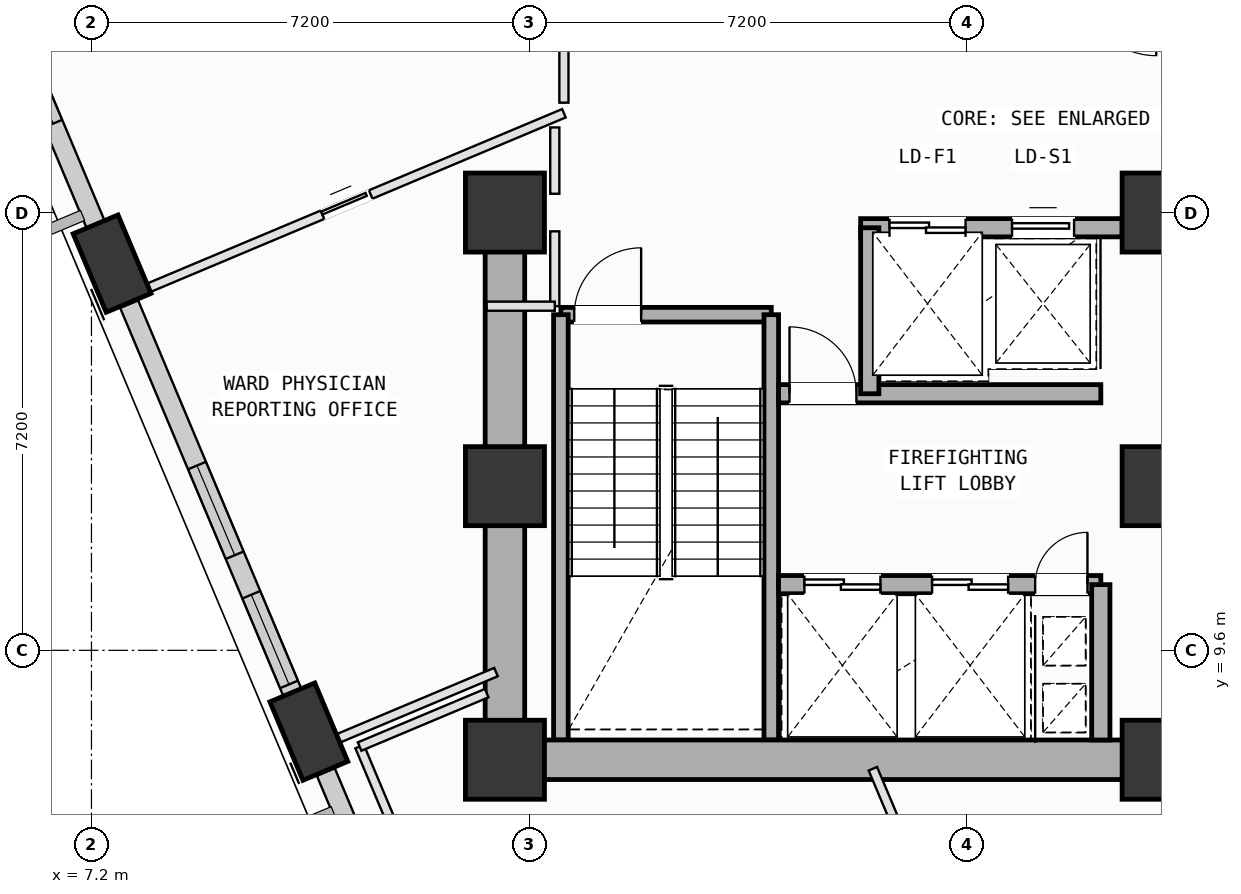
"""IFC4 building model, lengths in metres.
Left out: names, types, materials, properties, quantities, classifications, styles, units other than length and angle.
Written with IfcOpenShell. Run it as: python <this file> out.ifc"""

import sys

from ifc_helpers import new_model, si_unit, direction, frame, frame_2d, origin, origin_2d, place, context, subcontext, project, spatial, rectangle, extrude, element, fill, save


model = new_model("IFC4")
c1 = context("Model", 3, precision=1e-05, world=origin(), true_north=direction((0.0, 1.0)))
c2 = subcontext(c1, "Body", "Model", "MODEL_VIEW")
j1 = project(units=[si_unit("LENGTHUNIT", "METRE"), si_unit("PLANEANGLEUNIT", "RADIAN")], contexts=[c1])
p1 = place(None, origin())
s1 = spatial("IfcSite", under=j1, at=p1, CompositionType="ELEMENT")
p2 = place(p1, origin())
s2 = spatial("IfcBuilding", under=s1, at=p2, CompositionType="ELEMENT")
p3 = place(p2, frame((0.0, 0.0, 120.4)))
s3 = spatial("IfcBuildingStorey", under=s2, at=p3, CompositionType="ELEMENT", Elevation=120.4)
for number, where, z_axis, x_axis in (
    (1, (14.0, 7.8, 0.0), (0.0, 0.0, 1.0), (1.0, 0.0, 0.0)),
    (2, (14.0, 12.3, 0.0), (0.0, 0.0, 1.0), (1.0, 0.0, 0.0)),
    (3, (14.0, 16.8, 0.0), (0.0, 0.0, 1.0), (1.0, 0.0, 0.0)),
    (4, (24.8, 7.8, 0.0), (0.0, 0.0, 1.0), (1.0, 0.0, 0.0)),
    (5, (24.8, 12.3, 0.0), (0.0, 0.0, 1.0), (1.0, 0.0, 0.0)),
    (6, (24.8, 16.8, 0.0), (0.0, 0.0, 1.0), (1.0, 0.0, 0.0)),
):
    element("IfcColumn", number, at=place(p3, frame(where, z_axis=z_axis, x_axis=x_axis)), inside=s3, PredefinedType="COLUMN", context=c2, shape_type="SweptSolid", body=[
        extrude(rectangle(XDim=1.3, YDim=1.3, at=origin_2d()), origin(), (0.0, 0.0, 1.0), 4.0),
    ])
p4 = place(p3, frame((7.539, 15.96, 0.002), z_axis=(0.037268092554, -0.107069894569, 0.993552780155), x_axis=(-0.66706793096, 0.737629715316, 0.104512097711)))
e7 = element("IfcColumn", 7, at=p4, inside=s3, PredefinedType="COLUMN", context=c2, shape_type="SweptSolid", body=[
    extrude(rectangle(XDim=1.4, YDim=0.8, at=origin_2d()), origin(), (0.0, 0.0, 1.0), 4.022),
])
p5 = place(p3, frame((10.775, 8.263, 0.002), z_axis=(0.068869636682, -0.09344426475, 0.993239720575), x_axis=(-0.855179341889, 0.507165586938, 0.107011030419)))
e8 = element("IfcColumn", 8, at=p5, inside=s3, PredefinedType="COLUMN", context=c2, shape_type="SweptSolid", body=[
    extrude(rectangle(XDim=1.4, YDim=0.8, at=origin_2d()), origin(), (0.0, 0.0, 1.0), 4.023),
])
p6 = place(p3, frame((7.435, 16.208, 0.0), z_axis=(0.0, 0.0, 1.0), x_axis=(-0.387540340387, 0.921852745601, 0.0)))
e9 = element("IfcWall", 9, at=p6, inside=s3, PredefinedType="SOLIDWALL", context=c2, shape_type="SweptSolid", body=[
    extrude(rectangle(XDim=5.662, YDim=0.32, at=frame_2d((2.831, 0.0))), origin(), (0.0, 0.0, 1.0), 3.165),
])
p7 = place(p6, frame((2.23, 0.0, 0.75)))
e10 = element("IfcOpeningElement", 10, at=p7, cuts=e9, PredefinedType="OPENING", context=c2, shape_type="SweptSolid", body=[
    extrude(rectangle(XDim=1.2, YDim=1.75, at=frame_2d((0.6, 0.875))), frame((0.0, 0.17, 0.0), z_axis=(0.0, -1.0, 0.0), x_axis=(1.0, 0.0, 0.0)), (0.0, 0.0, 1.0), 0.34),
])
p8 = place(p3, frame((10.672, 8.508, 0.0), z_axis=(0.0, 0.0, 1.0), x_axis=(-0.387524577065, 0.921859372231, 0.0)))
e11 = element("IfcWall", 11, at=p8, inside=s3, PredefinedType="SOLIDWALL", context=c2, shape_type="SweptSolid", body=[
    extrude(rectangle(XDim=7.36, YDim=0.32, at=frame_2d((3.68, 0.0))), origin(), (0.0, 0.0, 1.0), 3.165),
])
p9 = place(p8, frame((2.881, 0.0, 0.75)))
e12 = element("IfcOpeningElement", 12, at=p9, cuts=e11, PredefinedType="OPENING", context=c2, shape_type="SweptSolid", body=[
    extrude(rectangle(XDim=1.6, YDim=1.95, at=frame_2d((0.8, 0.975))), frame((0.0, 0.17, 0.0), z_axis=(0.0, -1.0, 0.0), x_axis=(1.0, 0.0, 0.0)), (0.0, 0.0, 1.0), 0.34),
])
p10 = place(p8, frame((0.576, 0.0, 0.75)))
e13 = element("IfcOpeningElement", 13, at=p10, cuts=e11, PredefinedType="OPENING", context=c2, shape_type="SweptSolid", body=[
    extrude(rectangle(XDim=1.6, YDim=1.95, at=frame_2d((0.8, 0.975))), frame((0.0, 0.17, 0.0), z_axis=(0.0, -1.0, 0.0), x_axis=(1.0, 0.0, 0.0)), (0.0, 0.0, 1.0), 0.34),
])
p11 = place(p3, frame((13.466, 1.862, 0.0), z_axis=(0.0, 0.0, 1.0), x_axis=(-0.387499238031, 0.921870023661, 0.0)))
e14 = element("IfcWall", 14, at=p11, inside=s3, PredefinedType="SOLIDWALL", context=c2, shape_type="SweptSolid", body=[
    extrude(rectangle(XDim=6.224, YDim=0.32, at=frame_2d((3.112, 0.0))), origin(), (0.0, 0.0, 1.0), 3.165),
])
p12 = place(p11, frame((2.114, 0.0, 0.75)))
e15 = element("IfcOpeningElement", 15, at=p12, cuts=e14, PredefinedType="OPENING", context=c2, shape_type="SweptSolid", body=[
    extrude(rectangle(XDim=2.0, YDim=1.95, at=frame_2d((1.0, 0.975))), frame((0.0, 0.17, 0.0), z_axis=(0.0, -1.0, 0.0), x_axis=(1.0, 0.0, 0.0)), (0.0, 0.0, 1.0), 0.34),
])
p13 = place(p3, frame((14.92, 15.12, 0.0), z_axis=(0.0, 0.0, 1.0), x_axis=(1.0, 0.0, 0.0)))
e16 = element("IfcWall", 16, at=p13, inside=s3, PredefinedType="SOLIDWALL", context=c2, shape_type="SweptSolid", body=[
    extrude(rectangle(XDim=3.46, YDim=0.24, at=frame_2d((1.73, 0.0))), origin(), (0.0, 0.0, 1.0), 3.78),
])
p14 = place(p13, frame((0.22, 0.0, 0.0)))
e17 = element("IfcOpeningElement", 17, at=p14, cuts=e16, PredefinedType="OPENING", context=c2, shape_type="SweptSolid", body=[
    extrude(rectangle(XDim=1.1, YDim=2.15, at=frame_2d((0.55, 1.075))), frame((0.0, 0.13, 0.0), z_axis=(0.0, -1.0, 0.0), x_axis=(1.0, 0.0, 0.0)), (0.0, 0.0, 1.0), 0.26),
])
for number, where, z_axis, x_axis in (
    (18, (18.38, 15.12, 0.0), (0.0, 0.0, 1.0), (0.0, -1.0, 0.0)),
    (19, (14.92, 8.125, 0.0), (0.0, 0.0, 1.0), (0.0, 1.0, 0.0)),
):
    element("IfcWall", number, at=place(p3, frame(where, z_axis=z_axis, x_axis=x_axis)), inside=s3, PredefinedType="SOLIDWALL", context=c2, shape_type="SweptSolid", body=[
        extrude(rectangle(XDim=6.995, YDim=0.24, at=frame_2d((3.498, 0.0))), origin(), (0.0, 0.0, 1.0), 3.78),
    ])
for number, where, z_axis, x_axis in (
    (20, (14.0, 7.8, 0.0), (0.0, 0.0, 1.0), (1.0, 0.0, 0.0)),
    (21, (24.8, 7.8, 0.0), (0.0, 0.0, 1.0), (1.0, 0.0, 0.0)),
):
    element("IfcWall", number, at=place(p3, frame(where, z_axis=z_axis, x_axis=x_axis)), inside=s3, PredefinedType="SHEAR", context=c2, shape_type="SweptSolid", body=[
        extrude(rectangle(XDim=10.8, YDim=0.65, at=frame_2d((5.4, 0.0))), origin(), (0.0, 0.0, 1.0), 3.78),
    ])
p15 = place(p3, frame((14.0, 16.8, 0.0), z_axis=(0.0, 0.0, 1.0), x_axis=(0.0, -1.0, 0.0)))
e22 = element("IfcWall", 22, at=p15, inside=s3, PredefinedType="SHEAR", context=c2, shape_type="SweptSolid", body=[
    extrude(rectangle(XDim=9.0, YDim=0.65, at=frame_2d((4.5, 0.0))), origin(), (0.0, 0.0, 1.0), 3.78),
])
p16 = place(p3, frame((19.85, 16.55, 0.0), z_axis=(0.0, 0.0, 1.0), x_axis=(1.0, 0.0, 0.0)))
e23 = element("IfcWall", 23, at=p16, inside=s3, PredefinedType="SOLIDWALL", context=c2, shape_type="SweptSolid", body=[
    extrude(rectangle(XDim=4.3, YDim=0.3, at=frame_2d((2.15, 0.0))), origin(), (0.0, 0.0, 1.0), 3.78),
])
p17 = place(p16, frame((0.475, 0.0, 0.0)))
e24 = element("IfcOpeningElement", 24, at=p17, cuts=e23, PredefinedType="OPENING", context=c2, shape_type="SweptSolid", body=[
    extrude(rectangle(XDim=1.25, YDim=2.18, at=frame_2d((0.625, 1.09))), frame((0.0, 0.16, 0.0), z_axis=(0.0, -1.0, 0.0), x_axis=(1.0, 0.0, 0.0)), (0.0, 0.0, 1.0), 0.32),
])
p18 = place(p16, frame((2.49, 0.0, 0.0)))
e25 = element("IfcOpeningElement", 25, at=p18, cuts=e23, PredefinedType="OPENING", context=c2, shape_type="SweptSolid", body=[
    extrude(rectangle(XDim=1.02, YDim=2.12, at=frame_2d((0.51, 1.06))), frame((0.0, 0.16, 0.0), z_axis=(0.0, -1.0, 0.0), x_axis=(1.0, 0.0, 0.0)), (0.0, 0.0, 1.0), 0.32),
])
p19 = place(p3, frame((18.5, 10.68, 0.0), z_axis=(0.0, 0.0, 1.0), x_axis=(1.0, 0.0, 0.0)))
e26 = element("IfcWall", 26, at=p19, inside=s3, PredefinedType="SOLIDWALL", context=c2, shape_type="SweptSolid", body=[
    extrude(rectangle(XDim=5.3, YDim=0.3, at=frame_2d((2.65, 0.0))), origin(), (0.0, 0.0, 1.0), 3.78),
])
p20 = place(p19, frame((4.22, 0.0, 0.0)))
e27 = element("IfcOpeningElement", 27, at=p20, cuts=e26, PredefinedType="OPENING", context=c2, shape_type="SweptSolid", body=[
    extrude(rectangle(XDim=0.86, YDim=2.06, at=frame_2d((0.43, 1.03))), frame((0.0, 0.16, 0.0), z_axis=(0.0, -1.0, 0.0), x_axis=(1.0, 0.0, 0.0)), (0.0, 0.0, 1.0), 0.32),
])
p21 = place(p19, frame((0.425, 0.0, 0.0)))
e28 = element("IfcOpeningElement", 28, at=p21, cuts=e26, PredefinedType="OPENING", context=c2, shape_type="SweptSolid", body=[
    extrude(rectangle(XDim=1.25, YDim=2.18, at=frame_2d((0.625, 1.09))), frame((0.0, 0.16, 0.0), z_axis=(0.0, -1.0, 0.0), x_axis=(1.0, 0.0, 0.0)), (0.0, 0.0, 1.0), 0.32),
])
p22 = place(p19, frame((2.525, 0.0, 0.0)))
e29 = element("IfcOpeningElement", 29, at=p22, cuts=e26, PredefinedType="OPENING", context=c2, shape_type="SweptSolid", body=[
    extrude(rectangle(XDim=1.25, YDim=2.18, at=frame_2d((0.625, 1.09))), frame((0.0, 0.16, 0.0), z_axis=(0.0, -1.0, 0.0), x_axis=(1.0, 0.0, 0.0)), (0.0, 0.0, 1.0), 0.32),
])
p23 = place(p3, frame((18.5, 13.82, 0.0), z_axis=(0.0, 0.0, 1.0), x_axis=(1.0, 0.0, 0.0)))
e30 = element("IfcWall", 30, at=p23, inside=s3, PredefinedType="SOLIDWALL", context=c2, shape_type="SweptSolid", body=[
    extrude(rectangle(XDim=5.3, YDim=0.3, at=frame_2d((2.65, 0.0))), origin(), (0.0, 0.0, 1.0), 3.78),
])
p24 = place(p23, frame((0.18, 0.0, 0.0)))
e31 = element("IfcOpeningElement", 31, at=p24, cuts=e30, PredefinedType="OPENING", context=c2, shape_type="SweptSolid", body=[
    extrude(rectangle(XDim=1.1, YDim=2.15, at=frame_2d((0.55, 1.075))), frame((0.0, 0.16, 0.0), z_axis=(0.0, -1.0, 0.0), x_axis=(1.0, 0.0, 0.0)), (0.0, 0.0, 1.0), 0.32),
])
p25 = place(p3, frame((23.8, 8.125, 0.0), z_axis=(0.0, 0.0, 1.0), x_axis=(0.0, 1.0, 0.0)))
e32 = element("IfcWall", 32, at=p25, inside=s3, PredefinedType="SOLIDWALL", context=c2, shape_type="SweptSolid", body=[
    extrude(rectangle(XDim=2.555, YDim=0.3, at=frame_2d((1.277, 0.0))), origin(), (0.0, 0.0, 1.0), 3.78),
])
p26 = place(p3, frame((20.0, 13.82, 0.0), z_axis=(0.0, 0.0, 1.0), x_axis=(0.0, 1.0, 0.0)))
e33 = element("IfcWall", 33, at=p26, inside=s3, PredefinedType="SOLIDWALL", context=c2, shape_type="SweptSolid", body=[
    extrude(rectangle(XDim=2.73, YDim=0.3, at=frame_2d((1.365, 0.0))), origin(), (0.0, 0.0, 1.0), 3.78),
])
p27 = place(p3, frame((16.545, -3.722, 0.0), z_axis=(0.0, 0.0, 1.0), x_axis=(-0.387528098658, 0.921857891841, 0.0)))
e34 = element("IfcWall", 34, at=p27, inside=s3, PredefinedType="PARTITIONING", context=c2, shape_type="SweptSolid", body=[
    extrude(rectangle(XDim=12.734, YDim=0.15, at=frame_2d((6.367, 0.0))), origin(), (0.0, 0.0, 1.0), 3.165),
])
p28 = place(p3, frame((11.61, 8.017, 0.0), z_axis=(0.0, 0.0, 1.0), x_axis=(0.921797458045, 0.38767182815, 0.0)))
e35 = element("IfcWall", 35, at=p28, inside=s3, PredefinedType="PARTITIONING", context=c2, shape_type="SweptSolid", body=[
    extrude(rectangle(XDim=2.267, YDim=0.15, at=frame_2d((1.134, 0.0))), origin(), (0.0, 0.0, 1.0), 3.78),
])
p29 = place(p3, frame((20.051, 7.652, 0.0), z_axis=(0.0, 0.0, 1.0), x_axis=(0.387477050982, -0.921879349461, 0.0)))
e36 = element("IfcWall", 36, at=p29, inside=s3, PredefinedType="PARTITIONING", context=c2, shape_type="SweptSolid", body=[
    extrude(rectangle(XDim=11.557, YDim=0.15, at=frame_2d((5.778, 0.0))), origin(), (0.0, 0.0, 1.0), 3.78),
])
p30 = place(p29, frame((5.511, 0.0, 0.0)))
e37 = element("IfcOpeningElement", 37, at=p30, cuts=e36, PredefinedType="OPENING", context=c2, shape_type="SweptSolid", body=[
    extrude(rectangle(XDim=0.86, YDim=2.06, at=frame_2d((0.43, 1.03))), frame((0.0, 0.085, 0.0), z_axis=(0.0, -1.0, 0.0), x_axis=(1.0, 0.0, 0.0)), (0.0, 0.0, 1.0), 0.17),
])
p31 = place(p3, frame((14.82, 18.2, 0.0), z_axis=(0.0, 0.0, 1.0), x_axis=(0.0, -1.0, 0.0)))
e38 = element("IfcWall", 38, at=p31, inside=s3, PredefinedType="PARTITIONING", context=c2, shape_type="SweptSolid", body=[
    extrude(rectangle(XDim=1.091, YDim=0.15, at=frame_2d((0.545, 0.0))), origin(), (0.0, 0.0, 1.0), 3.78),
])
p32 = place(p3, frame((14.82, 16.491, 0.0), z_axis=(0.0, 0.0, 1.0), x_axis=(0.0, -1.0, 0.0)))
e39 = element("IfcWall", 39, at=p32, inside=s3, PredefinedType="PARTITIONING", context=c2, shape_type="SweptSolid", body=[
    extrude(rectangle(XDim=1.231, YDim=0.15, at=frame_2d((0.615, 0.0))), origin(), (0.0, 0.0, 1.0), 3.78),
])
p33 = place(p3, frame((14.82, 15.26, 0.0), z_axis=(0.0, 0.0, 1.0), x_axis=(-1.0, 0.0, 0.0)))
e40 = element("IfcWall", 40, at=p33, inside=s3, PredefinedType="PARTITIONING", context=c2, shape_type="SweptSolid", body=[
    extrude(rectangle(XDim=1.12, YDim=0.15, at=frame_2d((0.56, 0.0))), origin(), (0.0, 0.0, 1.0), 3.78),
])
p34 = place(p3, frame((13.853, 9.242, 0.0), z_axis=(0.0, 0.0, 1.0), x_axis=(-0.921859178331, -0.387525038321, 0.0)))
e41 = element("IfcWall", 41, at=p34, inside=s3, PredefinedType="PARTITIONING", context=c2, shape_type="SweptSolid", body=[
    extrude(rectangle(XDim=3.447, YDim=0.15, at=frame_2d((1.724, 0.0))), origin(), (0.0, 0.0, 1.0), 3.78),
])
p35 = place(p3, frame((10.675, 7.906, 0.0), z_axis=(0.0, 0.0, 1.0), x_axis=(-0.386702592906, 0.922204480926, 0.0)))
e42 = element("IfcWall", 42, at=p35, inside=s3, PredefinedType="PARTITIONING", context=c2, shape_type="SweptSolid", body=[
    extrude(rectangle(XDim=0.556, YDim=0.15, at=frame_2d((0.278, 0.0))), origin(), (0.0, 0.0, 1.0), 3.165),
])
p36 = place(p3, frame((7.822, 15.428, 0.0), z_axis=(0.0, 0.0, 1.0), x_axis=(0.921844455802, 0.387560058968, 0.0)))
e43 = element("IfcWall", 43, at=p36, inside=s3, PredefinedType="PARTITIONING", context=c2, shape_type="SweptSolid", body=[
    extrude(rectangle(XDim=7.754, YDim=0.15, at=frame_2d((3.877, 0.0))), origin(), (0.0, 0.0, 1.0), 3.78),
])
p37 = place(p36, frame((3.447, 0.0, 0.0)))
e44 = element("IfcOpeningElement", 44, at=p37, cuts=e43, PredefinedType="OPENING", context=c2, shape_type="SweptSolid", body=[
    extrude(rectangle(XDim=0.86, YDim=2.06, at=frame_2d((0.43, 1.03))), frame((0.0, 0.085, 0.0), z_axis=(0.0, -1.0, 0.0), x_axis=(1.0, 0.0, 0.0)), (0.0, 0.0, 1.0), 0.17),
])
p38 = place(p3, frame((14.97, 20.55, 0.0), z_axis=(0.0, 0.0, 1.0), x_axis=(0.0, -1.0, 0.0)))
e45 = element("IfcWall", 45, at=p38, inside=s3, PredefinedType="PARTITIONING", context=c2, shape_type="SweptSolid", body=[
    extrude(rectangle(XDim=1.943, YDim=0.15, at=frame_2d((0.972, 0.0))), origin(), (0.0, 0.0, 1.0), 3.78),
])
p39 = place(p3, frame((7.498, 15.466, 0.0), z_axis=(0.0, 0.0, 1.0), x_axis=(-0.386915874997, 0.922115017596, 0.0)))
e46 = element("IfcWall", 46, at=p39, inside=s3, PredefinedType="PARTITIONING", context=c2, shape_type="SweptSolid", body=[
    extrude(rectangle(XDim=0.708, YDim=0.15, at=frame_2d((0.354, 0.0))), origin(), (0.0, 0.0, 1.0), 3.165),
])
p40 = place(p7, origin())
e47 = element("IfcWindow", 47, at=p40, inside=s3, PartitioningType="SINGLE_PANEL", PredefinedType="WINDOW", context=c2, shape_type="SweptSolid", body=[
    extrude(rectangle(XDim=1.2, YDim=1.75, at=frame_2d((0.6, 0.875))), frame((0.0, 0.03, 0.0), z_axis=(0.0, -1.0, 0.0), x_axis=(1.0, 0.0, 0.0)), (0.0, 0.0, 1.0), 0.06),
])
fill(e10, e47)
p41 = place(p9, origin())
e48 = element("IfcWindow", 48, at=p41, inside=s3, PartitioningType="SINGLE_PANEL", PredefinedType="WINDOW", context=c2, shape_type="SweptSolid", body=[
    extrude(rectangle(XDim=1.6, YDim=1.95, at=frame_2d((0.8, 0.975))), frame((0.0, 0.03, 0.0), z_axis=(0.0, -1.0, 0.0), x_axis=(1.0, 0.0, 0.0)), (0.0, 0.0, 1.0), 0.06),
])
fill(e12, e48)
p42 = place(p10, origin())
e49 = element("IfcWindow", 49, at=p42, inside=s3, PartitioningType="SINGLE_PANEL", PredefinedType="WINDOW", context=c2, shape_type="SweptSolid", body=[
    extrude(rectangle(XDim=1.6, YDim=1.95, at=frame_2d((0.8, 0.975))), frame((0.0, 0.03, 0.0), z_axis=(0.0, -1.0, 0.0), x_axis=(1.0, 0.0, 0.0)), (0.0, 0.0, 1.0), 0.06),
])
fill(e13, e49)
p43 = place(p14, origin())
e50 = element("IfcDoor", 50, at=p43, inside=s3, OperationType="SINGLE_SWING_RIGHT", PredefinedType="DOOR", context=c2, shape_type="SweptSolid", body=[
    extrude(rectangle(XDim=1.1, YDim=2.15, at=frame_2d((0.55, 1.075))), frame((0.0, 0.025, 0.0), z_axis=(0.0, -1.0, 0.0), x_axis=(1.0, 0.0, 0.0)), (0.0, 0.0, 1.0), 0.05),
])
fill(e17, e50)
p44 = place(p20, origin())
e51 = element("IfcDoor", 51, at=p44, inside=s3, OperationType="SINGLE_SWING_RIGHT", PredefinedType="DOOR", context=c2, shape_type="SweptSolid", body=[
    extrude(rectangle(XDim=0.86, YDim=2.06, at=frame_2d((0.43, 1.03))), frame((0.0, 0.025, 0.0), z_axis=(0.0, -1.0, 0.0), x_axis=(1.0, 0.0, 0.0)), (0.0, 0.0, 1.0), 0.05),
])
fill(e27, e51)
p45 = place(p24, origin())
e52 = element("IfcDoor", 52, at=p45, inside=s3, OperationType="SINGLE_SWING_LEFT", PredefinedType="DOOR", context=c2, shape_type="SweptSolid", body=[
    extrude(rectangle(XDim=1.1, YDim=2.15, at=frame_2d((0.55, 1.075))), frame((0.0, 0.025, 0.0), z_axis=(0.0, -1.0, 0.0), x_axis=(1.0, 0.0, 0.0)), (0.0, 0.0, 1.0), 0.05),
])
fill(e31, e52)
p46 = place(p21, origin())
e53 = element("IfcDoor", 53, at=p46, inside=s3, OperationType="DOUBLE_DOOR_SLIDING", PredefinedType="DOOR", context=c2, shape_type="SweptSolid", body=[
    extrude(rectangle(XDim=1.25, YDim=2.18, at=frame_2d((0.625, 1.09))), frame((0.0, 0.025, 0.0), z_axis=(0.0, -1.0, 0.0), x_axis=(1.0, 0.0, 0.0)), (0.0, 0.0, 1.0), 0.05),
])
fill(e28, e53)
p47 = place(p22, origin())
e54 = element("IfcDoor", 54, at=p47, inside=s3, OperationType="DOUBLE_DOOR_SLIDING", PredefinedType="DOOR", context=c2, shape_type="SweptSolid", body=[
    extrude(rectangle(XDim=1.25, YDim=2.18, at=frame_2d((0.625, 1.09))), frame((0.0, 0.025, 0.0), z_axis=(0.0, -1.0, 0.0), x_axis=(1.0, 0.0, 0.0)), (0.0, 0.0, 1.0), 0.05),
])
fill(e29, e54)
p48 = place(p17, origin())
e55 = element("IfcDoor", 55, at=p48, inside=s3, OperationType="DOUBLE_DOOR_SLIDING", PredefinedType="DOOR", context=c2, shape_type="SweptSolid", body=[
    extrude(rectangle(XDim=1.25, YDim=2.18, at=frame_2d((0.625, 1.09))), frame((0.0, 0.025, 0.0), z_axis=(0.0, -1.0, 0.0), x_axis=(1.0, 0.0, 0.0)), (0.0, 0.0, 1.0), 0.05),
])
fill(e24, e55)
p49 = place(p18, origin())
e56 = element("IfcDoor", 56, at=p49, inside=s3, OperationType="SLIDING_TO_LEFT", PredefinedType="DOOR", context=c2, shape_type="SweptSolid", body=[
    extrude(rectangle(XDim=1.02, YDim=2.12, at=frame_2d((0.51, 1.06))), frame((0.0, 0.025, 0.0), z_axis=(0.0, -1.0, 0.0), x_axis=(1.0, 0.0, 0.0)), (0.0, 0.0, 1.0), 0.05),
])
fill(e25, e56)
p50 = place(p37, origin())
e57 = element("IfcDoor", 57, at=p50, inside=s3, OperationType="SLIDING_TO_LEFT", PredefinedType="DOOR", context=c2, shape_type="SweptSolid", body=[
    extrude(rectangle(XDim=0.86, YDim=2.06, at=frame_2d((0.43, 1.03))), frame((0.0, 0.025, 0.0), z_axis=(0.0, -1.0, 0.0), x_axis=(1.0, 0.0, 0.0)), (0.0, 0.0, 1.0), 0.05),
])
fill(e44, e57)
save(model, sys.argv[1])
